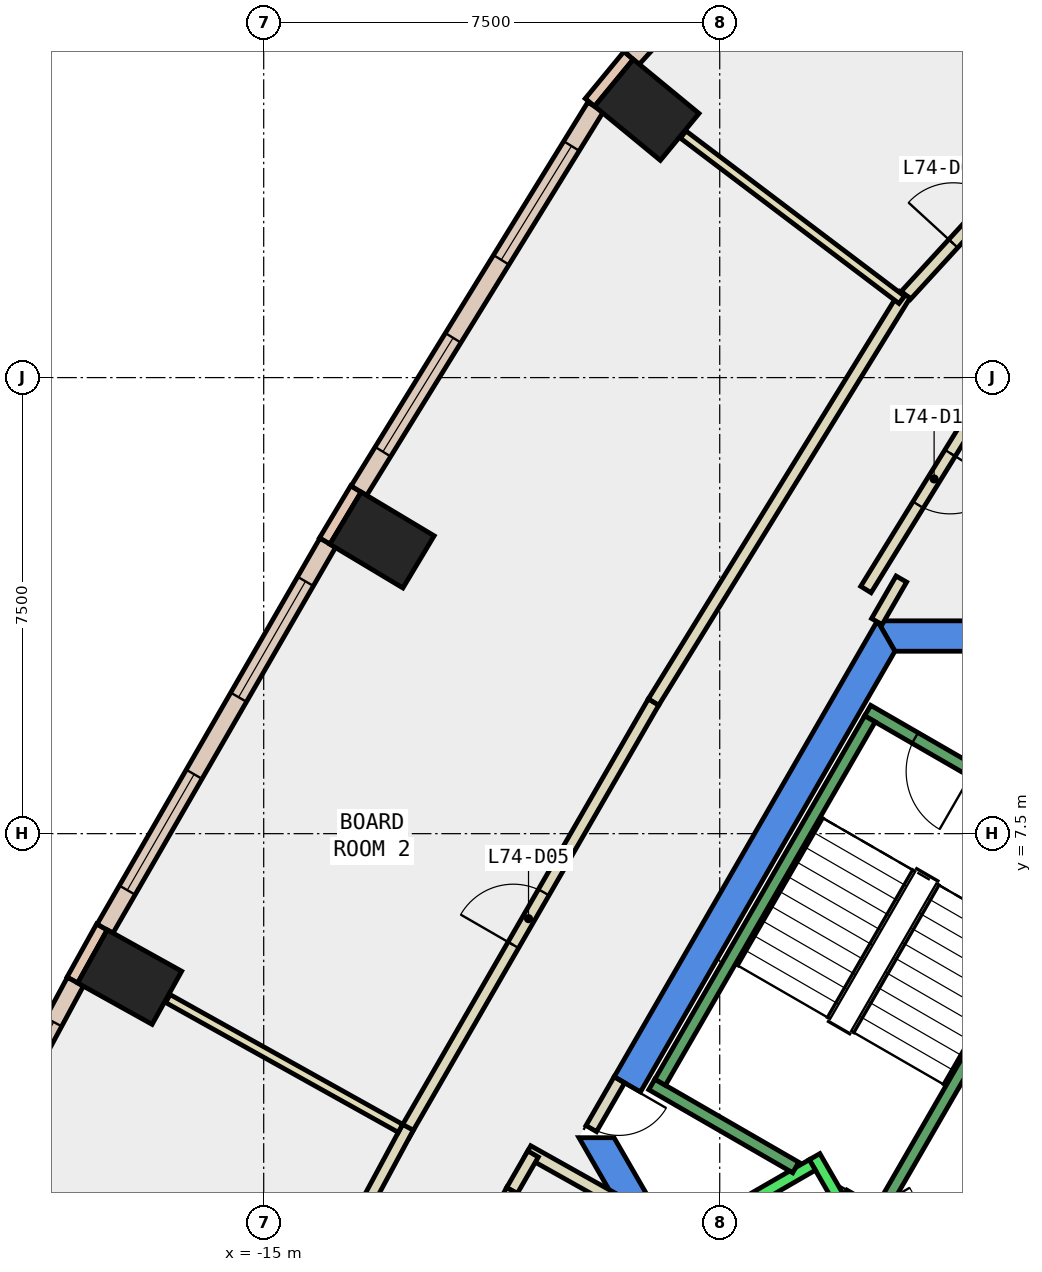
"""IFC4 building model, lengths in metres.
Left out: names, types, materials, properties, quantities, classifications, styles, units other than length and angle.
Written with IfcOpenShell. Run it as: python <this file> out.ifc"""

import sys

from ifc_helpers import new_model, si_unit, direction, frame, frame_2d, origin, origin_2d, place, context, subcontext, project, spatial, polyline, rectangle, outline, extrude, element, fill, save


model = new_model("IFC4")
c1 = context("Model", 3, precision=1e-05, world=origin(), true_north=direction((0.0, 1.0)))
c2 = subcontext(c1, "Body", "Model", "MODEL_VIEW")
j1 = project(units=[si_unit("LENGTHUNIT", "METRE"), si_unit("PLANEANGLEUNIT", "RADIAN")], contexts=[c1])
p1 = place(None, origin())
s1 = spatial("IfcSite", under=j1, at=p1, CompositionType="ELEMENT")
p2 = place(p1, origin())
s2 = spatial("IfcBuilding", under=s1, at=p2, CompositionType="ELEMENT")
p3 = place(p2, frame((0.0, 0.0, 315.2)))
s3 = spatial("IfcBuildingStorey", under=s2, at=p3, CompositionType="ELEMENT", Elevation=315.2)
for number, where, z_axis, x_axis in (
    (1, (-8.699, 19.403, -0.34), (0.0, 0.0, 1.0), (0.636, 0.772, 0.0)),
    (2, (-13.054, 12.329, -0.34), (0.0, 0.0, 1.0), (0.514, 0.858, 0.0)),
    (3, (-17.204, 5.141, -0.34), (0.0, 0.0, 1.0), (0.486, 0.874, 0.0)),
):
    element("IfcColumn", number, at=place(p3, frame(where, z_axis=z_axis, x_axis=x_axis)), inside=s3, PredefinedType="COLUMN", context=c2, shape_type="SweptSolid", body=[
        extrude(rectangle(XDim=1.0, YDim=1.4, at=origin_2d()), origin(), (0.0, 0.0, 1.0), 3.6),
    ])
p4 = place(p3, frame((0.0, 0.0, -0.34)))
e4 = element("IfcWall", 4, at=p4, inside=s3, PredefinedType="SHEAR", context=c2, shape_type="SweptSolid", body=[
    extrude(outline(polyline([(4.907, 11.0), (-4.907, 11.0), (-4.619, 10.5), (4.619, 10.5), (4.907, 11.0)])), origin(), (0.0, 0.0, 1.0), 3.6),
])
p5 = place(p3, frame((0.0, 0.0, -0.34)))
e5 = element("IfcWall", 5, at=p5, inside=s3, PredefinedType="SHEAR", context=c2, shape_type="SweptSolid", body=[
    extrude(outline(polyline([(-9.236, 3.502), (-8.803, 3.253), (-4.619, 10.5), (-4.907, 11.0), (-9.236, 3.502)])), origin(), (0.0, 0.0, 1.0), 3.6),
])
p6 = place(p3, frame((0.0, 0.0, -0.34)))
e6 = element("IfcWall", 6, at=p6, inside=s3, PredefinedType="SHEAR", context=c2, shape_type="SweptSolid", body=[
    extrude(outline(polyline([(-9.815, 2.5), (-4.907, -6.0), (-4.619, -5.5), (-9.238, 2.5), (-9.815, 2.5)])), origin(), (0.0, 0.0, 1.0), 3.6),
])
p7 = place(p3, frame((-8.999, 20.297, 0.0), z_axis=(0.0, 0.0, 1.0), x_axis=(-0.6357329148, -0.77190910154, 0.0)))
e7 = element("IfcWall", 7, at=p7, inside=s3, PredefinedType="STANDARD", context=c2, shape_type="SweptSolid", body=[
    extrude(rectangle(XDim=1.0, YDim=0.2, at=frame_2d((0.5, 0.0))), origin(), (0.0, 0.0, 1.0), 3.26),
])
p8 = place(p3, frame((-13.483, 13.17, 0.0), z_axis=(0.0, 0.0, 1.0), x_axis=(-0.514064933905, -0.857751271482, 0.0)))
e8 = element("IfcWall", 8, at=p8, inside=s3, PredefinedType="STANDARD", context=c2, shape_type="SweptSolid", body=[
    extrude(rectangle(XDim=1.0, YDim=0.2, at=frame_2d((0.5, 0.0))), origin(), (0.0, 0.0, 1.0), 3.26),
])
p9 = place(p3, frame((-17.661, 5.966, 0.0), z_axis=(0.0, 0.0, 1.0), x_axis=(-0.486036693078, -0.873938403425, 0.0)))
e9 = element("IfcWall", 9, at=p9, inside=s3, PredefinedType="STANDARD", context=c2, shape_type="SweptSolid", body=[
    extrude(rectangle(XDim=1.0, YDim=0.2, at=frame_2d((0.5, 0.0))), origin(), (0.0, 0.0, 1.0), 3.26),
])
p10 = place(p3, frame((-5.898, 23.566, 0.0), z_axis=(0.0, 0.0, 1.0), x_axis=(-0.675798306171, -0.737086595575, 0.0)))
e10 = element("IfcWall", 10, at=p10, inside=s3, PredefinedType="STANDARD", context=c2, shape_type="SweptSolid", body=[
    extrude(rectangle(XDim=4.501, YDim=0.3, at=frame_2d((2.25, 0.0))), origin(), (0.0, 0.0, 1.0), 3.26),
])
p11 = place(p10, frame((1.551, 0.0, 0.9)))
e11 = element("IfcOpeningElement", 11, at=p11, cuts=e10, PredefinedType="OPENING", context=c2, shape_type="SweptSolid", body=[
    extrude(rectangle(XDim=1.4, YDim=2.0, at=frame_2d((0.7, 1.0))), frame((0.0, 0.16, 0.0), z_axis=(0.0, -1.0, 0.0), x_axis=(1.0, 0.0, 0.0)), (0.0, 0.0, 1.0), 0.32),
])
p12 = place(p3, frame((-9.542, 19.45, 0.0), z_axis=(0.0, 0.0, 1.0), x_axis=(-0.525070792614, -0.851058554239, 0.0)))
e12 = element("IfcWall", 12, at=p12, inside=s3, PredefinedType="STANDARD", context=c2, shape_type="SweptSolid", body=[
    extrude(rectangle(XDim=7.414, YDim=0.3, at=frame_2d((3.707, 0.0))), origin(), (0.0, 0.0, 1.0), 3.26),
])
p13 = place(p12, frame((0.754, 0.0, 0.9)))
e13 = element("IfcOpeningElement", 13, at=p13, cuts=e12, PredefinedType="OPENING", context=c2, shape_type="SweptSolid", body=[
    extrude(rectangle(XDim=2.2, YDim=2.0, at=frame_2d((1.1, 1.0))), frame((0.0, 0.16, 0.0), z_axis=(0.0, -1.0, 0.0), x_axis=(1.0, 0.0, 0.0)), (0.0, 0.0, 1.0), 0.32),
])
p14 = place(p12, frame((4.461, 0.0, 0.9)))
e14 = element("IfcOpeningElement", 14, at=p14, cuts=e12, PredefinedType="OPENING", context=c2, shape_type="SweptSolid", body=[
    extrude(rectangle(XDim=2.2, YDim=2.0, at=frame_2d((1.1, 1.0))), frame((0.0, 0.16, 0.0), z_axis=(0.0, -1.0, 0.0), x_axis=(1.0, 0.0, 0.0)), (0.0, 0.0, 1.0), 0.32),
])
p15 = place(p3, frame((-13.947, 12.283, 0.0), z_axis=(0.0, 0.0, 1.0), x_axis=(-0.499923391538, -0.866069629183, 0.0)))
e15 = element("IfcWall", 15, at=p15, inside=s3, PredefinedType="STANDARD", context=c2, shape_type="SweptSolid", body=[
    extrude(rectangle(XDim=7.327, YDim=0.3, at=frame_2d((3.664, 0.0))), origin(), (0.0, 0.0, 1.0), 3.26),
])
p16 = place(p15, frame((0.732, 0.0, 0.9)))
e16 = element("IfcOpeningElement", 16, at=p16, cuts=e15, PredefinedType="OPENING", context=c2, shape_type="SweptSolid", body=[
    extrude(rectangle(XDim=2.2, YDim=2.0, at=frame_2d((1.1, 1.0))), frame((0.0, 0.16, 0.0), z_axis=(0.0, -1.0, 0.0), x_axis=(1.0, 0.0, 0.0)), (0.0, 0.0, 1.0), 0.32),
])
p17 = place(p15, frame((4.395, 0.0, 0.9)))
e17 = element("IfcOpeningElement", 17, at=p17, cuts=e15, PredefinedType="OPENING", context=c2, shape_type="SweptSolid", body=[
    extrude(rectangle(XDim=2.2, YDim=2.0, at=frame_2d((1.1, 1.0))), frame((0.0, 0.16, 0.0), z_axis=(0.0, -1.0, 0.0), x_axis=(1.0, 0.0, 0.0)), (0.0, 0.0, 1.0), 0.32),
])
p18 = place(p3, frame((-18.097, 5.066, 0.0), z_axis=(0.0, 0.0, 1.0), x_axis=(-0.474421773145, -0.880297666228, 0.0)))
e18 = element("IfcWall", 18, at=p18, inside=s3, PredefinedType="STANDARD", context=c2, shape_type="SweptSolid", body=[
    extrude(rectangle(XDim=7.416, YDim=0.3, at=frame_2d((3.708, 0.0))), origin(), (0.0, 0.0, 1.0), 3.26),
])
p19 = place(p18, frame((0.754, 0.0, 0.9)))
e19 = element("IfcOpeningElement", 19, at=p19, cuts=e18, PredefinedType="OPENING", context=c2, shape_type="SweptSolid", body=[
    extrude(rectangle(XDim=2.2, YDim=2.0, at=frame_2d((1.1, 1.0))), frame((0.0, 0.16, 0.0), z_axis=(0.0, -1.0, 0.0), x_axis=(1.0, 0.0, 0.0)), (0.0, 0.0, 1.0), 0.32),
])
p20 = place(p18, frame((4.462, 0.0, 0.9)))
e20 = element("IfcOpeningElement", 20, at=p20, cuts=e18, PredefinedType="OPENING", context=c2, shape_type="SweptSolid", body=[
    extrude(rectangle(XDim=2.2, YDim=2.0, at=frame_2d((1.1, 1.0))), frame((0.0, 0.16, 0.0), z_axis=(0.0, -1.0, 0.0), x_axis=(1.0, 0.0, 0.0)), (0.0, 0.0, 1.0), 0.32),
])
p21 = place(p3, frame((-2.852, 15.152, 0.0), z_axis=(0.0, 0.0, 1.0), x_axis=(-0.525050105661, -0.851071316956, 0.0)))
e21 = element("IfcWall", 21, at=p21, inside=s3, PredefinedType="PARTITIONING", context=c2, shape_type="SweptSolid", body=[
    extrude(rectangle(XDim=4.274, YDim=0.2, at=frame_2d((2.137, 0.0))), origin(), (0.0, 0.0, 1.0), 3.26),
])
p22 = place(p21, frame((1.637, 0.0, 0.0)))
e22 = element("IfcOpeningElement", 22, at=p22, cuts=e21, PredefinedType="OPENING", context=c2, shape_type="SweptSolid", body=[
    extrude(rectangle(XDim=1.0, YDim=2.1, at=frame_2d((0.5, 1.05))), frame((0.0, 0.11, 0.0), z_axis=(0.0, -1.0, 0.0), x_axis=(1.0, 0.0, 0.0)), (0.0, 0.0, 1.0), 0.22),
])
p23 = place(p3, frame((-4.513, 11.687, 0.0), z_axis=(0.0, 0.0, 1.0), x_axis=(-0.499556546863, -0.866281280235, 0.0)))
e23 = element("IfcWall", 23, at=p23, inside=s3, PredefinedType="PARTITIONING", context=c2, shape_type="SweptSolid", body=[
    extrude(rectangle(XDim=0.807, YDim=0.2, at=frame_2d((0.403, 0.0))), origin(), (0.0, 0.0, 1.0), 3.26),
])
p24 = place(p3, frame((-9.203, 1.465, 0.0), z_axis=(0.0, 0.0, 1.0), x_axis=(-0.872341127106, 0.488897696823, 0.0)))
e24 = element("IfcWall", 24, at=p24, inside=s3, PredefinedType="PARTITIONING", context=c2, shape_type="SweptSolid", body=[
    extrude(rectangle(XDim=1.667, YDim=0.2, at=frame_2d((0.833, 0.0))), origin(), (0.0, 0.0, 1.0), 3.26),
])
p25 = place(p3, frame((-10.57, 2.232, 0.0), z_axis=(0.0, 0.0, 1.0), x_axis=(-0.500037208726, -0.86600392025, 0.0)))
e25 = element("IfcWall", 25, at=p25, inside=s3, PredefinedType="PARTITIONING", context=c2, shape_type="SweptSolid", body=[
    extrude(rectangle(XDim=0.694, YDim=0.2, at=frame_2d((0.347, 0.0))), origin(), (0.0, 0.0, 1.0), 3.26),
])
p26 = place(p3, frame((-10.917, 1.631, 0.0), z_axis=(0.0, 0.0, 1.0), x_axis=(-0.47449538478, -0.880257990491, 0.0)))
e26 = element("IfcWall", 26, at=p26, inside=s3, PredefinedType="PARTITIONING", context=c2, shape_type="SweptSolid", body=[
    extrude(rectangle(XDim=7.655, YDim=0.2, at=frame_2d((3.827, 0.0))), origin(), (0.0, 0.0, 1.0), 3.26),
])
p27 = place(p26, frame((2.927, 0.0, 0.0)))
e27 = element("IfcOpeningElement", 27, at=p27, cuts=e26, PredefinedType="OPENING", context=c2, shape_type="SweptSolid", body=[
    extrude(rectangle(XDim=1.8, YDim=2.1, at=frame_2d((0.9, 1.05))), frame((0.0, 0.11, 0.0), z_axis=(0.0, -1.0, 0.0), x_axis=(1.0, 0.0, 0.0)), (0.0, 0.0, 1.0), 0.22),
])
p28 = place(p3, frame((-4.439, 16.353, 0.0), z_axis=(0.0, 0.0, 1.0), x_axis=(0.675731313907, 0.737148011871, 0.0)))
e28 = element("IfcWall", 28, at=p28, inside=s3, PredefinedType="PARTITIONING", context=c2, shape_type="SweptSolid", body=[
    extrude(rectangle(XDim=3.307, YDim=0.2, at=frame_2d((1.654, 0.0))), origin(), (0.0, 0.0, 1.0), 3.26),
])
p29 = place(p28, frame((1.154, 0.0, 0.0)))
e29 = element("IfcOpeningElement", 29, at=p29, cuts=e28, PredefinedType="OPENING", context=c2, shape_type="SweptSolid", body=[
    extrude(rectangle(XDim=1.0, YDim=2.1, at=frame_2d((0.5, 1.05))), frame((0.0, 0.11, 0.0), z_axis=(0.0, -1.0, 0.0), x_axis=(1.0, 0.0, 0.0)), (0.0, 0.0, 1.0), 0.22),
])
p30 = place(p3, frame((-12.701, 2.54, 0.0), z_axis=(0.0, 0.0, 1.0), x_axis=(0.499946799636, 0.86605611685, 0.0)))
e30 = element("IfcWall", 30, at=p30, inside=s3, PredefinedType="PARTITIONING", context=c2, shape_type="SweptSolid", body=[
    extrude(rectangle(XDim=8.227, YDim=0.2, at=frame_2d((4.114, 0.0))), origin(), (0.0, 0.0, 1.0), 3.26),
])
p31 = place(p30, frame((3.613, 0.0, 0.0)))
e31 = element("IfcOpeningElement", 31, at=p31, cuts=e30, PredefinedType="OPENING", context=c2, shape_type="SweptSolid", body=[
    extrude(rectangle(XDim=1.0, YDim=2.1, at=frame_2d((0.5, 1.05))), frame((0.0, 0.11, 0.0), z_axis=(0.0, -1.0, 0.0), x_axis=(1.0, 0.0, 0.0)), (0.0, 0.0, 1.0), 0.22),
])
p32 = place(p3, frame((-8.588, 9.665, 0.0), z_axis=(0.0, 0.0, 1.0), x_axis=(0.525142215688, 0.851014484778, 0.0)))
e32 = element("IfcWall", 32, at=p32, inside=s3, PredefinedType="PARTITIONING", context=c2, shape_type="SweptSolid", body=[
    extrude(rectangle(XDim=7.872, YDim=0.2, at=frame_2d((3.936, 0.0))), origin(), (0.0, 0.0, 1.0), 3.26),
])
p33 = place(p3, frame((-16.399, -4.325, 0.0), z_axis=(0.0, 0.0, 1.0), x_axis=(0.474489967676, 0.880260910512, 0.0)))
e33 = element("IfcWall", 33, at=p33, inside=s3, PredefinedType="PARTITIONING", context=c2, shape_type="SweptSolid", body=[
    extrude(rectangle(XDim=7.948, YDim=0.2, at=frame_2d((3.974, 0.0))), origin(), (0.0, 0.0, 1.0), 3.26),
])
p34 = place(p33, frame((3.474, 0.0, 0.0)))
e34 = element("IfcOpeningElement", 34, at=p34, cuts=e33, PredefinedType="OPENING", context=c2, shape_type="SweptSolid", body=[
    extrude(rectangle(XDim=1.0, YDim=2.1, at=frame_2d((0.5, 1.05))), frame((0.0, 0.11, 0.0), z_axis=(0.0, -1.0, 0.0), x_axis=(1.0, 0.0, 0.0)), (0.0, 0.0, 1.0), 0.22),
])
p35 = place(p3, frame((-4.507, 16.279, 0.0), z_axis=(0.0, 0.0, 1.0), x_axis=(-0.797594482062, 0.603194033611, 0.0)))
e35 = element("IfcWall", 35, at=p35, inside=s3, PredefinedType="PARTITIONING", context=c2, shape_type="SweptSolid", body=[
    extrude(rectangle(XDim=4.506, YDim=0.15, at=frame_2d((2.253, 0.0))), origin(), (0.0, 0.0, 1.0), 3.26),
])
p36 = place(p3, frame((-12.751, 2.654, 0.0), z_axis=(0.0, 0.0, 1.0), x_axis=(-0.873277679945, 0.487222837837, 0.0)))
e36 = element("IfcWall", 36, at=p36, inside=s3, PredefinedType="PARTITIONING", context=c2, shape_type="SweptSolid", body=[
    extrude(rectangle(XDim=4.38, YDim=0.15, at=frame_2d((2.19, 0.0))), origin(), (0.0, 0.0, 1.0), 3.26),
])
p37 = place(p3, frame((-9.15, 3.452, 0.0), z_axis=(0.0, 0.0, 1.0), x_axis=(-0.500079945886, -0.865979242085, 0.0)))
e37 = element("IfcWall", 37, at=p37, inside=s3, PredefinedType="PARTITIONING", context=c2, shape_type="SweptSolid", body=[
    extrude(rectangle(XDim=0.926, YDim=0.2, at=frame_2d((0.463, 0.0))), origin(), (0.0, 0.0, 1.0), 2.4),
])
p38 = place(p37, frame((0.017, 0.0, 0.0)))
e38 = element("IfcOpeningElement", 38, at=p38, cuts=e37, PredefinedType="OPENING", context=c2, shape_type="SweptSolid", body=[
    extrude(rectangle(XDim=0.9, YDim=2.1, at=frame_2d((0.45, 1.05))), frame((0.0, 0.11, 0.0), z_axis=(0.0, -1.0, 0.0), x_axis=(1.0, 0.0, 0.0)), (0.0, 0.0, 1.0), 0.22),
])
p39 = place(p3, frame((-5.94, 2.188, 0.0), z_axis=(0.0, 0.0, 1.0), x_axis=(0.500034260056, -0.866005622828, 0.0)))
e39 = element("IfcWall", 39, at=p39, inside=s3, PredefinedType="STANDARD", context=c2, shape_type="SweptSolid", body=[
    extrude(rectangle(XDim=5.399, YDim=0.2, at=frame_2d((2.7, 0.0))), origin(), (0.0, 0.0, 1.0), 3.26),
])
p40 = place(p39, frame((3.075, 0.0, 0.0)))
e40 = element("IfcOpeningElement", 40, at=p40, cuts=e39, PredefinedType="OPENING", context=c2, shape_type="SweptSolid", body=[
    extrude(rectangle(XDim=1.1, YDim=2.1, at=frame_2d((0.55, 1.05))), frame((0.0, 0.11, 0.0), z_axis=(0.0, -1.0, 0.0), x_axis=(1.0, 0.0, 0.0)), (0.0, 0.0, 1.0), 0.22),
])
p41 = place(p39, frame((1.225, 0.0, 0.0)))
e41 = element("IfcOpeningElement", 41, at=p41, cuts=e39, PredefinedType="OPENING", context=c2, shape_type="SweptSolid", body=[
    extrude(rectangle(XDim=1.1, YDim=2.1, at=frame_2d((0.55, 1.05))), frame((0.0, 0.11, 0.0), z_axis=(0.0, -1.0, 0.0), x_axis=(1.0, 0.0, 0.0)), (0.0, 0.0, 1.0), 0.22),
])
p42 = place(p3, frame((-5.977, 2.052, 0.0), z_axis=(0.0, 0.0, 1.0), x_axis=(-0.865973769406, -0.500089422704, 0.0)))
e42 = element("IfcWall", 42, at=p42, inside=s3, PredefinedType="STANDARD", context=c2, shape_type="SweptSolid", body=[
    extrude(rectangle(XDim=2.399, YDim=0.2, at=frame_2d((1.2, 0.0))), origin(), (0.0, 0.0, 1.0), 3.26),
])
p43 = place(p3, frame((-1.256, 7.324, 0.0), z_axis=(0.0, 0.0, 1.0), x_axis=(-0.866046073146, 0.499964197906, 0.0)))
e43 = element("IfcWall", 43, at=p43, inside=s3, PredefinedType="STANDARD", context=c2, shape_type="SweptSolid", body=[
    extrude(rectangle(XDim=4.4, YDim=0.2, at=frame_2d((2.2, 0.0))), origin(), (0.0, 0.0, 1.0), 3.26),
])
p44 = place(p43, frame((2.4, 0.0, 0.0)))
e44 = element("IfcOpeningElement", 44, at=p44, cuts=e43, PredefinedType="OPENING", context=c2, shape_type="SweptSolid", body=[
    extrude(rectangle(XDim=1.1, YDim=2.2, at=frame_2d((0.55, 1.1))), frame((0.0, 0.11, 0.0), z_axis=(0.0, -1.0, 0.0), x_axis=(1.0, 0.0, 0.0)), (0.0, 0.0, 1.0), 0.22),
])
p45 = place(p3, frame((-6.25, 2.01, 0.0), z_axis=(0.0, 0.0, 1.0), x_axis=(-0.86611865017, 0.499838457731, 0.0)))
e45 = element("IfcWall", 45, at=p45, inside=s3, PredefinedType="STANDARD", context=c2, shape_type="SweptSolid", body=[
    extrude(rectangle(XDim=2.733, YDim=0.2, at=frame_2d((1.366, 0.0))), origin(), (0.0, 0.0, 1.0), 3.26),
])
p46 = place(p3, frame((-4.806, 1.176, 0.0), z_axis=(0.0, 0.0, 1.0), x_axis=(-0.866558586415, 0.499075361355, 0.0)))
e46 = element("IfcWall", 46, at=p46, inside=s3, PredefinedType="STANDARD", context=c2, shape_type="SweptSolid", body=[
    extrude(rectangle(XDim=0.751, YDim=0.2, at=frame_2d((0.376, 0.0))), origin(), (0.0, 0.0, 1.0), 3.26),
])
p47 = place(p3, frame((-1.393, 7.288, 0.0), z_axis=(0.0, 0.0, 1.0), x_axis=(-0.499963383562, -0.866046543262, 0.0)))
e47 = element("IfcWall", 47, at=p47, inside=s3, PredefinedType="STANDARD", context=c2, shape_type="SweptSolid", body=[
    extrude(rectangle(XDim=6.9, YDim=0.2, at=frame_2d((3.45, 0.0))), origin(), (0.0, 0.0, 1.0), 3.26),
])
p48 = place(p47, frame((0.45, 0.0, 0.0)))
e48 = element("IfcOpeningElement", 48, at=p48, cuts=e47, PredefinedType="OPENING", context=c2, shape_type="SweptSolid", body=[
    extrude(rectangle(XDim=1.1, YDim=2.2, at=frame_2d((0.55, 1.1))), frame((0.0, 0.11, 0.0), z_axis=(0.0, -1.0, 0.0), x_axis=(1.0, 0.0, 0.0)), (0.0, 0.0, 1.0), 0.22),
])
p49 = place(p3, frame((-5.03, 9.388, 0.0), z_axis=(0.0, 0.0, 1.0), x_axis=(-0.499978703459, -0.866037698999, 0.0)))
e49 = element("IfcWall", 49, at=p49, inside=s3, PredefinedType="STANDARD", context=c2, shape_type="SweptSolid", body=[
    extrude(rectangle(XDim=6.9, YDim=0.2, at=frame_2d((3.45, 0.0))), origin(), (0.0, 0.0, 1.0), 3.26),
])
p50 = place(p13, origin())
e50 = element("IfcWindow", 50, at=p50, inside=s3, PartitioningType="SINGLE_PANEL", PredefinedType="WINDOW", context=c2, shape_type="SweptSolid", body=[
    extrude(rectangle(XDim=2.2, YDim=2.0, at=frame_2d((1.1, 1.0))), frame((0.0, 0.03, 0.0), z_axis=(0.0, -1.0, 0.0), x_axis=(1.0, 0.0, 0.0)), (0.0, 0.0, 1.0), 0.06),
])
fill(e13, e50)
p51 = place(p14, origin())
e51 = element("IfcWindow", 51, at=p51, inside=s3, PartitioningType="SINGLE_PANEL", PredefinedType="WINDOW", context=c2, shape_type="SweptSolid", body=[
    extrude(rectangle(XDim=2.2, YDim=2.0, at=frame_2d((1.1, 1.0))), frame((0.0, 0.03, 0.0), z_axis=(0.0, -1.0, 0.0), x_axis=(1.0, 0.0, 0.0)), (0.0, 0.0, 1.0), 0.06),
])
fill(e14, e51)
p52 = place(p16, origin())
e52 = element("IfcWindow", 52, at=p52, inside=s3, PartitioningType="SINGLE_PANEL", PredefinedType="WINDOW", context=c2, shape_type="SweptSolid", body=[
    extrude(rectangle(XDim=2.2, YDim=2.0, at=frame_2d((1.1, 1.0))), frame((0.0, 0.03, 0.0), z_axis=(0.0, -1.0, 0.0), x_axis=(1.0, 0.0, 0.0)), (0.0, 0.0, 1.0), 0.06),
])
fill(e16, e52)
p53 = place(p17, origin())
e53 = element("IfcWindow", 53, at=p53, inside=s3, PartitioningType="SINGLE_PANEL", PredefinedType="WINDOW", context=c2, shape_type="SweptSolid", body=[
    extrude(rectangle(XDim=2.2, YDim=2.0, at=frame_2d((1.1, 1.0))), frame((0.0, 0.03, 0.0), z_axis=(0.0, -1.0, 0.0), x_axis=(1.0, 0.0, 0.0)), (0.0, 0.0, 1.0), 0.06),
])
fill(e17, e53)
p54 = place(p19, origin())
e54 = element("IfcWindow", 54, at=p54, inside=s3, PartitioningType="SINGLE_PANEL", PredefinedType="WINDOW", context=c2, shape_type="SweptSolid", body=[
    extrude(rectangle(XDim=2.2, YDim=2.0, at=frame_2d((1.1, 1.0))), frame((0.0, 0.03, 0.0), z_axis=(0.0, -1.0, 0.0), x_axis=(1.0, 0.0, 0.0)), (0.0, 0.0, 1.0), 0.06),
])
fill(e19, e54)
p55 = place(p29, origin())
e55 = element("IfcDoor", 55, at=p55, inside=s3, OperationType="SINGLE_SWING_LEFT", PredefinedType="DOOR", context=c2, shape_type="SweptSolid", body=[
    extrude(rectangle(XDim=1.0, YDim=2.1, at=frame_2d((0.5, 1.05))), frame((0.0, 0.025, 0.0), z_axis=(0.0, -1.0, 0.0), x_axis=(1.0, 0.0, 0.0)), (0.0, 0.0, 1.0), 0.05),
])
fill(e29, e55)
p56 = place(p31, origin())
e56 = element("IfcDoor", 56, at=p56, inside=s3, OperationType="SINGLE_SWING_RIGHT", PredefinedType="DOOR", context=c2, shape_type="SweptSolid", body=[
    extrude(rectangle(XDim=1.0, YDim=2.1, at=frame_2d((0.5, 1.05))), frame((0.0, 0.025, 0.0), z_axis=(0.0, -1.0, 0.0), x_axis=(1.0, 0.0, 0.0)), (0.0, 0.0, 1.0), 0.05),
])
fill(e31, e56)
p57 = place(p22, origin())
e57 = element("IfcDoor", 57, at=p57, inside=s3, OperationType="SINGLE_SWING_LEFT", PredefinedType="DOOR", context=c2, shape_type="SweptSolid", body=[
    extrude(rectangle(XDim=1.0, YDim=2.1, at=frame_2d((0.5, 1.05))), frame((0.0, 0.025, 0.0), z_axis=(0.0, -1.0, 0.0), x_axis=(1.0, 0.0, 0.0)), (0.0, 0.0, 1.0), 0.05),
])
fill(e22, e57)
p58 = place(p38, origin())
e58 = element("IfcDoor", 58, at=p58, inside=s3, OperationType="SINGLE_SWING_LEFT", PredefinedType="DOOR", context=c2, shape_type="SweptSolid", body=[
    extrude(rectangle(XDim=0.9, YDim=2.1, at=frame_2d((0.45, 1.05))), frame((0.0, 0.025, 0.0), z_axis=(0.0, -1.0, 0.0), x_axis=(1.0, 0.0, 0.0)), (0.0, 0.0, 1.0), 0.05),
])
fill(e38, e58)
p59 = place(p44, origin())
e59 = element("IfcDoor", 59, at=p59, inside=s3, OperationType="SINGLE_SWING_LEFT", PredefinedType="DOOR", context=c2, shape_type="SweptSolid", body=[
    extrude(rectangle(XDim=1.1, YDim=2.2, at=frame_2d((0.55, 1.1))), frame((0.0, 0.025, 0.0), z_axis=(0.0, -1.0, 0.0), x_axis=(1.0, 0.0, 0.0)), (0.0, 0.0, 1.0), 0.05),
])
fill(e44, e59)
save(model, sys.argv[1])
